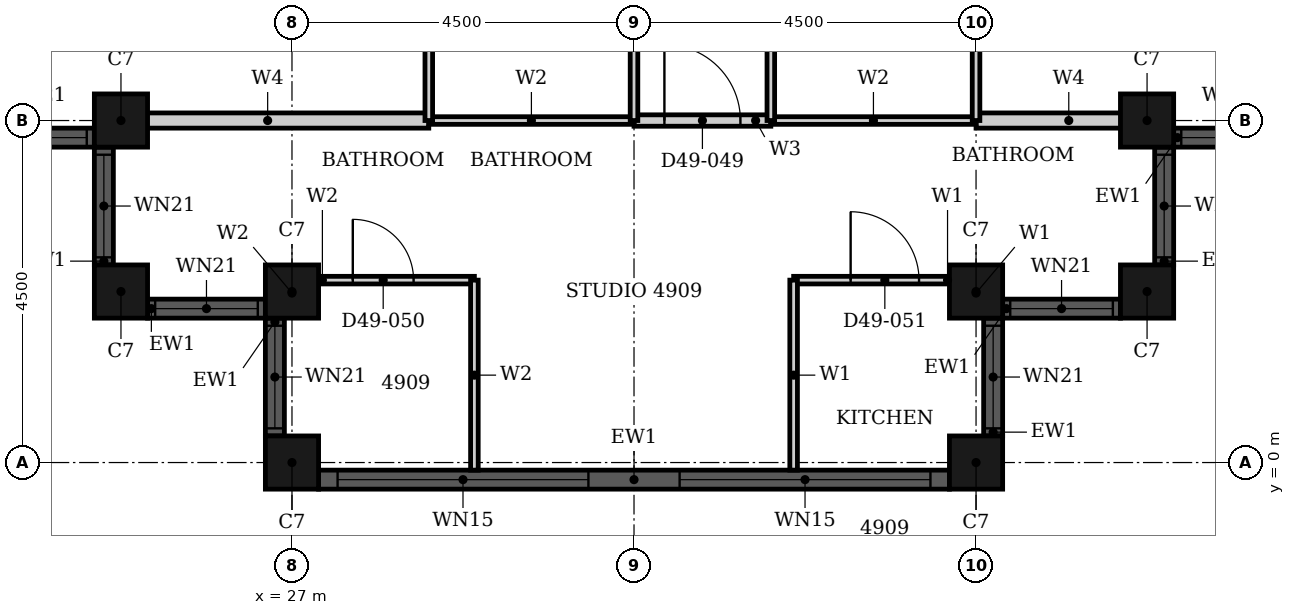
"""IFC4 building model, lengths in metres.
Left out: names, types, materials, properties, quantities, classifications, styles, units other than length and angle.
Written with IfcOpenShell. Run it as: python <this file> out.ifc"""

import sys

from ifc_helpers import new_model, si_unit, direction, frame, frame_2d, origin, origin_2d, place, context, subcontext, project, spatial, rectangle, hollow_rectangle, extrude, element, fill, save


model = new_model("IFC4")
c1 = context("Model", 3, precision=1e-05, world=origin(), true_north=direction((0.0, 1.0)))
c2 = subcontext(c1, "Body", "Model", "MODEL_VIEW")
j1 = project(units=[si_unit("LENGTHUNIT", "METRE"), si_unit("PLANEANGLEUNIT", "RADIAN")], contexts=[c1])
p1 = place(None, origin())
s1 = spatial("IfcSite", under=j1, at=p1, CompositionType="ELEMENT")
p2 = place(p1, origin())
s2 = spatial("IfcBuilding", under=s1, at=p2, CompositionType="ELEMENT")
p3 = place(p2, frame((0.0, 0.0, 196.1)))
s3 = spatial("IfcBuildingStorey", under=s2, at=p3, CompositionType="ELEMENT", Elevation=196.1)
for number, where, z_axis, x_axis in (
    (1, (24.75, 4.5, 0.0), (0.0, 0.0, 1.0), (1.0, 0.0, 0.0)),
    (2, (24.75, 2.25, 0.0), (0.0, 0.0, 1.0), (1.0, 0.0, 0.0)),
    (3, (27.0, 2.25, 0.0), (0.0, 0.0, 1.0), (1.0, 0.0, 0.0)),
    (4, (27.0, 0.0, 0.0), (0.0, 0.0, 1.0), (1.0, 0.0, 0.0)),
    (5, (36.0, 0.0, 0.0), (0.0, 0.0, 1.0), (1.0, 0.0, 0.0)),
    (6, (36.0, 2.25, 0.0), (0.0, 0.0, 1.0), (1.0, 0.0, 0.0)),
    (7, (38.25, 2.25, 0.0), (0.0, 0.0, 1.0), (1.0, 0.0, 0.0)),
    (8, (38.25, 4.5, 0.0), (0.0, 0.0, 1.0), (1.0, 0.0, 0.0)),
):
    element("IfcColumn", number, at=place(p3, frame(where, z_axis=z_axis, x_axis=x_axis)), inside=s3, PredefinedType="COLUMN", context=c2, shape_type="SweptSolid", body=[
        extrude(hollow_rectangle(XDim=0.7, YDim=0.7, WallThickness=0.022, at=origin_2d()), origin(), (0.0, 0.0, 1.0), 3.7),
    ])
p4 = place(p3, frame((22.85, 4.275, 0.0), z_axis=(0.0, 0.0, 1.0), x_axis=(1.0, 0.0, 0.0)))
e9 = element("IfcWall", 9, at=p4, inside=s3, PredefinedType="SOLIDWALL", context=c2, shape_type="SweptSolid", body=[
    extrude(rectangle(XDim=1.55, YDim=0.25, at=frame_2d((0.775, 0.0))), origin(), (0.0, 0.0, 1.0), 3.7),
])
p5 = place(p4, frame((0.1, 0.0, 0.9)))
e10 = element("IfcOpeningElement", 10, at=p5, cuts=e9, PredefinedType="OPENING", context=c2, shape_type="SweptSolid", body=[
    extrude(rectangle(XDim=1.35, YDim=1.85, at=frame_2d((0.675, 0.925))), frame((0.0, 0.135, 0.0), z_axis=(0.0, -1.0, 0.0), x_axis=(1.0, 0.0, 0.0)), (0.0, 0.0, 1.0), 0.27),
])
p6 = place(p3, frame((24.525, 4.15, 0.0), z_axis=(0.0, 0.0, 1.0), x_axis=(0.0, -1.0, 0.0)))
e11 = element("IfcWall", 11, at=p6, inside=s3, PredefinedType="SOLIDWALL", context=c2, shape_type="SweptSolid", body=[
    extrude(rectangle(XDim=1.55, YDim=0.25, at=frame_2d((0.775, 0.0))), origin(), (0.0, 0.0, 1.0), 3.7),
])
p7 = place(p6, frame((0.1, 0.0, 0.9)))
e12 = element("IfcOpeningElement", 12, at=p7, cuts=e11, PredefinedType="OPENING", context=c2, shape_type="SweptSolid", body=[
    extrude(rectangle(XDim=1.35, YDim=1.85, at=frame_2d((0.675, 0.925))), frame((0.0, 0.135, 0.0), z_axis=(0.0, -1.0, 0.0), x_axis=(1.0, 0.0, 0.0)), (0.0, 0.0, 1.0), 0.27),
])
p8 = place(p3, frame((25.1, 2.025, 0.0), z_axis=(0.0, 0.0, 1.0), x_axis=(1.0, 0.0, 0.0)))
e13 = element("IfcWall", 13, at=p8, inside=s3, PredefinedType="SOLIDWALL", context=c2, shape_type="SweptSolid", body=[
    extrude(rectangle(XDim=1.55, YDim=0.25, at=frame_2d((0.775, 0.0))), origin(), (0.0, 0.0, 1.0), 3.7),
])
p9 = place(p8, frame((0.1, 0.0, 0.9)))
e14 = element("IfcOpeningElement", 14, at=p9, cuts=e13, PredefinedType="OPENING", context=c2, shape_type="SweptSolid", body=[
    extrude(rectangle(XDim=1.35, YDim=1.85, at=frame_2d((0.675, 0.925))), frame((0.0, 0.135, 0.0), z_axis=(0.0, -1.0, 0.0), x_axis=(1.0, 0.0, 0.0)), (0.0, 0.0, 1.0), 0.27),
])
p10 = place(p3, frame((26.775, 1.9, 0.0), z_axis=(0.0, 0.0, 1.0), x_axis=(0.0, -1.0, 0.0)))
e15 = element("IfcWall", 15, at=p10, inside=s3, PredefinedType="SOLIDWALL", context=c2, shape_type="SweptSolid", body=[
    extrude(rectangle(XDim=1.55, YDim=0.25, at=frame_2d((0.775, 0.0))), origin(), (0.0, 0.0, 1.0), 3.7),
])
p11 = place(p10, frame((0.1, 0.0, 0.9)))
e16 = element("IfcOpeningElement", 16, at=p11, cuts=e15, PredefinedType="OPENING", context=c2, shape_type="SweptSolid", body=[
    extrude(rectangle(XDim=1.35, YDim=1.85, at=frame_2d((0.675, 0.925))), frame((0.0, 0.135, 0.0), z_axis=(0.0, -1.0, 0.0), x_axis=(1.0, 0.0, 0.0)), (0.0, 0.0, 1.0), 0.27),
])
p12 = place(p3, frame((27.35, -0.225, 0.0), z_axis=(0.0, 0.0, 1.0), x_axis=(1.0, 0.0, 0.0)))
e17 = element("IfcWall", 17, at=p12, inside=s3, PredefinedType="SOLIDWALL", context=c2, shape_type="SweptSolid", body=[
    extrude(rectangle(XDim=8.3, YDim=0.25, at=frame_2d((4.15, 0.0))), origin(), (0.0, 0.0, 1.0), 3.7),
])
p13 = place(p12, frame((0.25, 0.0, 0.45)))
e18 = element("IfcOpeningElement", 18, at=p13, cuts=e17, PredefinedType="OPENING", context=c2, shape_type="SweptSolid", body=[
    extrude(rectangle(XDim=3.3, YDim=2.3, at=frame_2d((1.65, 1.15))), frame((0.0, 0.135, 0.0), z_axis=(0.0, -1.0, 0.0), x_axis=(1.0, 0.0, 0.0)), (0.0, 0.0, 1.0), 0.27),
])
p14 = place(p12, frame((4.75, 0.0, 0.45)))
e19 = element("IfcOpeningElement", 19, at=p14, cuts=e17, PredefinedType="OPENING", context=c2, shape_type="SweptSolid", body=[
    extrude(rectangle(XDim=3.3, YDim=2.3, at=frame_2d((1.65, 1.15))), frame((0.0, 0.135, 0.0), z_axis=(0.0, -1.0, 0.0), x_axis=(1.0, 0.0, 0.0)), (0.0, 0.0, 1.0), 0.27),
])
p15 = place(p3, frame((36.225, 0.35, 0.0), z_axis=(0.0, 0.0, 1.0), x_axis=(0.0, 1.0, 0.0)))
e20 = element("IfcWall", 20, at=p15, inside=s3, PredefinedType="SOLIDWALL", context=c2, shape_type="SweptSolid", body=[
    extrude(rectangle(XDim=1.55, YDim=0.25, at=frame_2d((0.775, 0.0))), origin(), (0.0, 0.0, 1.0), 3.7),
])
p16 = place(p15, frame((0.1, 0.0, 0.9)))
e21 = element("IfcOpeningElement", 21, at=p16, cuts=e20, PredefinedType="OPENING", context=c2, shape_type="SweptSolid", body=[
    extrude(rectangle(XDim=1.35, YDim=1.85, at=frame_2d((0.675, 0.925))), frame((0.0, 0.135, 0.0), z_axis=(0.0, -1.0, 0.0), x_axis=(1.0, 0.0, 0.0)), (0.0, 0.0, 1.0), 0.27),
])
p17 = place(p3, frame((36.35, 2.025, 0.0), z_axis=(0.0, 0.0, 1.0), x_axis=(1.0, 0.0, 0.0)))
e22 = element("IfcWall", 22, at=p17, inside=s3, PredefinedType="SOLIDWALL", context=c2, shape_type="SweptSolid", body=[
    extrude(rectangle(XDim=1.55, YDim=0.25, at=frame_2d((0.775, 0.0))), origin(), (0.0, 0.0, 1.0), 3.7),
])
p18 = place(p17, frame((0.1, 0.0, 0.9)))
e23 = element("IfcOpeningElement", 23, at=p18, cuts=e22, PredefinedType="OPENING", context=c2, shape_type="SweptSolid", body=[
    extrude(rectangle(XDim=1.35, YDim=1.85, at=frame_2d((0.675, 0.925))), frame((0.0, 0.135, 0.0), z_axis=(0.0, -1.0, 0.0), x_axis=(1.0, 0.0, 0.0)), (0.0, 0.0, 1.0), 0.27),
])
p19 = place(p3, frame((38.475, 2.6, 0.0), z_axis=(0.0, 0.0, 1.0), x_axis=(0.0, 1.0, 0.0)))
e24 = element("IfcWall", 24, at=p19, inside=s3, PredefinedType="SOLIDWALL", context=c2, shape_type="SweptSolid", body=[
    extrude(rectangle(XDim=1.55, YDim=0.25, at=frame_2d((0.775, 0.0))), origin(), (0.0, 0.0, 1.0), 3.7),
])
p20 = place(p19, frame((0.1, 0.0, 0.9)))
e25 = element("IfcOpeningElement", 25, at=p20, cuts=e24, PredefinedType="OPENING", context=c2, shape_type="SweptSolid", body=[
    extrude(rectangle(XDim=1.35, YDim=1.85, at=frame_2d((0.675, 0.925))), frame((0.0, 0.135, 0.0), z_axis=(0.0, -1.0, 0.0), x_axis=(1.0, 0.0, 0.0)), (0.0, 0.0, 1.0), 0.27),
])
p21 = place(p3, frame((38.6, 4.275, 0.0), z_axis=(0.0, 0.0, 1.0), x_axis=(1.0, 0.0, 0.0)))
e26 = element("IfcWall", 26, at=p21, inside=s3, PredefinedType="SOLIDWALL", context=c2, shape_type="SweptSolid", body=[
    extrude(rectangle(XDim=1.55, YDim=0.25, at=frame_2d((0.775, 0.0))), origin(), (0.0, 0.0, 1.0), 3.7),
])
p22 = place(p21, frame((0.1, 0.0, 0.9)))
e27 = element("IfcOpeningElement", 27, at=p22, cuts=e26, PredefinedType="OPENING", context=c2, shape_type="SweptSolid", body=[
    extrude(rectangle(XDim=1.35, YDim=1.85, at=frame_2d((0.675, 0.925))), frame((0.0, 0.135, 0.0), z_axis=(0.0, -1.0, 0.0), x_axis=(1.0, 0.0, 0.0)), (0.0, 0.0, 1.0), 0.27),
])
p23 = place(p3, frame((31.5, 4.5, 0.0), z_axis=(0.0, 0.0, 1.0), x_axis=(1.0, 0.0, 0.0)))
e28 = element("IfcWall", 28, at=p23, inside=s3, PredefinedType="PARTITIONING", context=c2, shape_type="SweptSolid", body=[
    extrude(rectangle(XDim=1.8, YDim=0.15, at=frame_2d((0.9, 0.0))), origin(), (0.0, 0.0, 1.0), 3.4),
])
p24 = place(p23, frame((0.4, 0.0, 0.0)))
e29 = element("IfcOpeningElement", 29, at=p24, cuts=e28, PredefinedType="OPENING", context=c2, shape_type="SweptSolid", body=[
    extrude(rectangle(XDim=1.0, YDim=2.2, at=frame_2d((0.5, 1.1))), frame((0.0, 0.085, 0.0), z_axis=(0.0, -1.0, 0.0), x_axis=(1.0, 0.0, 0.0)), (0.0, 0.0, 1.0), 0.17),
])
p25 = place(p3, frame((33.6, 2.4, 0.0), z_axis=(0.0, 0.0, 1.0), x_axis=(1.0, 0.0, 0.0)))
e30 = element("IfcWall", 30, at=p25, inside=s3, PredefinedType="PARTITIONING", context=c2, shape_type="SweptSolid", body=[
    extrude(rectangle(XDim=2.4, YDim=0.1, at=frame_2d((1.2, 0.0))), origin(), (0.0, 0.0, 1.0), 3.4),
])
p26 = place(p25, frame((0.75, 0.0, 0.0)))
e31 = element("IfcOpeningElement", 31, at=p26, cuts=e30, PredefinedType="OPENING", context=c2, shape_type="SweptSolid", body=[
    extrude(rectangle(XDim=0.9, YDim=2.1, at=frame_2d((0.45, 1.05))), frame((0.0, 0.06, 0.0), z_axis=(0.0, -1.0, 0.0), x_axis=(1.0, 0.0, 0.0)), (0.0, 0.0, 1.0), 0.12),
])
p27 = place(p3, frame((33.6, -0.1, 0.0), z_axis=(0.0, 0.0, 1.0), x_axis=(0.0, 1.0, 0.0)))
e32 = element("IfcWall", 32, at=p27, inside=s3, PredefinedType="PARTITIONING", context=c2, shape_type="SweptSolid", body=[
    extrude(rectangle(XDim=2.5, YDim=0.1, at=frame_2d((1.25, 0.0))), origin(), (0.0, 0.0, 1.0), 3.4),
])
p28 = place(p3, frame((36.0, 2.06, 0.0), z_axis=(0.0, 0.0, 1.0), x_axis=(0.0, 1.0, 0.0)))
e33 = element("IfcWall", 33, at=p28, inside=s3, PredefinedType="PARTITIONING", context=c2, shape_type="SweptSolid", body=[
    extrude(rectangle(XDim=0.34, YDim=0.1, at=frame_2d((0.17, 0.0))), origin(), (0.0, 0.0, 1.0), 3.4),
])
p29 = place(p3, frame((36.0, 4.5, 0.0), z_axis=(0.0, 0.0, 1.0), x_axis=(1.0, 0.0, 0.0)))
e34 = element("IfcWall", 34, at=p29, inside=s3, PredefinedType="PARTITIONING", context=c2, shape_type="SweptSolid", body=[
    extrude(rectangle(XDim=2.44, YDim=0.2, at=frame_2d((1.22, 0.0))), origin(), (0.0, 0.0, 1.0), 3.4),
])
p30 = place(p3, frame((24.56, 4.5, 0.0), z_axis=(0.0, 0.0, 1.0), x_axis=(1.0, 0.0, 0.0)))
e35 = element("IfcWall", 35, at=p30, inside=s3, PredefinedType="PARTITIONING", context=c2, shape_type="SweptSolid", body=[
    extrude(rectangle(XDim=4.24, YDim=0.2, at=frame_2d((2.12, 0.0))), origin(), (0.0, 0.0, 1.0), 3.4),
])
p31 = place(p3, frame((27.0, 2.4, 0.0), z_axis=(0.0, 0.0, 1.0), x_axis=(1.0, 0.0, 0.0)))
e36 = element("IfcWall", 36, at=p31, inside=s3, PredefinedType="PARTITIONING", context=c2, shape_type="SweptSolid", body=[
    extrude(rectangle(XDim=2.4, YDim=0.1, at=frame_2d((1.2, 0.0))), origin(), (0.0, 0.0, 1.0), 3.4),
])
p32 = place(p31, frame((0.8, 0.0, 0.0)))
e37 = element("IfcOpeningElement", 37, at=p32, cuts=e36, PredefinedType="OPENING", context=c2, shape_type="SweptSolid", body=[
    extrude(rectangle(XDim=0.8, YDim=2.1, at=frame_2d((0.4, 1.05))), frame((0.0, 0.06, 0.0), z_axis=(0.0, -1.0, 0.0), x_axis=(1.0, 0.0, 0.0)), (0.0, 0.0, 1.0), 0.12),
])
for number, where, z_axis, x_axis in (
    (38, (33.3, 4.5, 0.0), (0.0, 0.0, 1.0), (1.0, 0.0, 0.0)),
    (39, (28.8, 4.5, 0.0), (0.0, 0.0, 1.0), (1.0, 0.0, 0.0)),
):
    element("IfcWall", number, at=place(p3, frame(where, z_axis=z_axis, x_axis=x_axis)), inside=s3, PredefinedType="PARTITIONING", context=c2, shape_type="SweptSolid", body=[
        extrude(rectangle(XDim=2.7, YDim=0.1, at=frame_2d((1.35, 0.0))), origin(), (0.0, 0.0, 1.0), 3.4),
    ])
p33 = place(p3, frame((27.0, 2.06, 0.0), z_axis=(0.0, 0.0, 1.0), x_axis=(0.0, 1.0, 0.0)))
e40 = element("IfcWall", 40, at=p33, inside=s3, PredefinedType="PARTITIONING", context=c2, shape_type="SweptSolid", body=[
    extrude(rectangle(XDim=0.34, YDim=0.1, at=frame_2d((0.17, 0.0))), origin(), (0.0, 0.0, 1.0), 3.4),
])
p34 = place(p3, frame((28.8, 4.5, 0.0), z_axis=(0.0, 0.0, 1.0), x_axis=(0.0, 1.0, 0.0)))
e41 = element("IfcWall", 41, at=p34, inside=s3, PredefinedType="PARTITIONING", context=c2, shape_type="SweptSolid", body=[
    extrude(rectangle(XDim=2.4, YDim=0.1, at=frame_2d((1.2, 0.0))), origin(), (0.0, 0.0, 1.0), 3.4),
])
p35 = place(p3, frame((29.4, -0.1, 0.0), z_axis=(0.0, 0.0, 1.0), x_axis=(0.0, 1.0, 0.0)))
e42 = element("IfcWall", 42, at=p35, inside=s3, PredefinedType="PARTITIONING", context=c2, shape_type="SweptSolid", body=[
    extrude(rectangle(XDim=2.5, YDim=0.1, at=frame_2d((1.25, 0.0))), origin(), (0.0, 0.0, 1.0), 3.4),
])
p36 = place(p3, frame((31.5, 4.5, 0.0), z_axis=(0.0, 0.0, 1.0), x_axis=(0.0, 1.0, 0.0)))
e43 = element("IfcWall", 43, at=p36, inside=s3, PredefinedType="PARTITIONING", context=c2, shape_type="SweptSolid", body=[
    extrude(rectangle(XDim=2.4, YDim=0.1, at=frame_2d((1.2, 0.0))), origin(), (0.0, 0.0, 1.0), 2.68),
])
p37 = place(p3, frame((33.3, 4.5, 0.0), z_axis=(0.0, 0.0, 1.0), x_axis=(0.0, 1.0, 0.0)))
e44 = element("IfcWall", 44, at=p37, inside=s3, PredefinedType="PARTITIONING", context=c2, shape_type="SweptSolid", body=[
    extrude(rectangle(XDim=2.4, YDim=0.1, at=frame_2d((1.2, 0.0))), origin(), (0.0, 0.0, 1.0), 3.4),
])
p38 = place(p3, frame((36.0, 4.5, 0.0), z_axis=(0.0, 0.0, 1.0), x_axis=(0.0, 1.0, 0.0)))
e45 = element("IfcWall", 45, at=p38, inside=s3, PredefinedType="PARTITIONING", context=c2, shape_type="SweptSolid", body=[
    extrude(rectangle(XDim=2.4, YDim=0.1, at=frame_2d((1.2, 0.0))), origin(), (0.0, 0.0, 1.0), 2.68),
])
p39 = place(p5, origin())
e46 = element("IfcWindow", 46, at=p39, inside=s3, PartitioningType="SINGLE_PANEL", PredefinedType="WINDOW", context=c2, shape_type="SweptSolid", body=[
    extrude(rectangle(XDim=1.35, YDim=1.85, at=frame_2d((0.675, 0.925))), frame((0.0, 0.03, 0.0), z_axis=(0.0, -1.0, 0.0), x_axis=(1.0, 0.0, 0.0)), (0.0, 0.0, 1.0), 0.06),
])
fill(e10, e46)
p40 = place(p7, origin())
e47 = element("IfcWindow", 47, at=p40, inside=s3, PartitioningType="SINGLE_PANEL", PredefinedType="WINDOW", context=c2, shape_type="SweptSolid", body=[
    extrude(rectangle(XDim=1.35, YDim=1.85, at=frame_2d((0.675, 0.925))), frame((0.0, 0.03, 0.0), z_axis=(0.0, -1.0, 0.0), x_axis=(1.0, 0.0, 0.0)), (0.0, 0.0, 1.0), 0.06),
])
fill(e12, e47)
p41 = place(p9, origin())
e48 = element("IfcWindow", 48, at=p41, inside=s3, PartitioningType="SINGLE_PANEL", PredefinedType="WINDOW", context=c2, shape_type="SweptSolid", body=[
    extrude(rectangle(XDim=1.35, YDim=1.85, at=frame_2d((0.675, 0.925))), frame((0.0, 0.03, 0.0), z_axis=(0.0, -1.0, 0.0), x_axis=(1.0, 0.0, 0.0)), (0.0, 0.0, 1.0), 0.06),
])
fill(e14, e48)
p42 = place(p11, origin())
e49 = element("IfcWindow", 49, at=p42, inside=s3, PartitioningType="SINGLE_PANEL", PredefinedType="WINDOW", context=c2, shape_type="SweptSolid", body=[
    extrude(rectangle(XDim=1.35, YDim=1.85, at=frame_2d((0.675, 0.925))), frame((0.0, 0.03, 0.0), z_axis=(0.0, -1.0, 0.0), x_axis=(1.0, 0.0, 0.0)), (0.0, 0.0, 1.0), 0.06),
])
fill(e16, e49)
p43 = place(p13, origin())
e50 = element("IfcWindow", 50, at=p43, inside=s3, PartitioningType="SINGLE_PANEL", PredefinedType="WINDOW", context=c2, shape_type="SweptSolid", body=[
    extrude(rectangle(XDim=3.3, YDim=2.3, at=frame_2d((1.65, 1.15))), frame((0.0, 0.03, 0.0), z_axis=(0.0, -1.0, 0.0), x_axis=(1.0, 0.0, 0.0)), (0.0, 0.0, 1.0), 0.06),
])
fill(e18, e50)
p44 = place(p14, origin())
e51 = element("IfcWindow", 51, at=p44, inside=s3, PartitioningType="SINGLE_PANEL", PredefinedType="WINDOW", context=c2, shape_type="SweptSolid", body=[
    extrude(rectangle(XDim=3.3, YDim=2.3, at=frame_2d((1.65, 1.15))), frame((0.0, 0.03, 0.0), z_axis=(0.0, -1.0, 0.0), x_axis=(1.0, 0.0, 0.0)), (0.0, 0.0, 1.0), 0.06),
])
fill(e19, e51)
p45 = place(p16, origin())
e52 = element("IfcWindow", 52, at=p45, inside=s3, PartitioningType="SINGLE_PANEL", PredefinedType="WINDOW", context=c2, shape_type="SweptSolid", body=[
    extrude(rectangle(XDim=1.35, YDim=1.85, at=frame_2d((0.675, 0.925))), frame((0.0, 0.03, 0.0), z_axis=(0.0, -1.0, 0.0), x_axis=(1.0, 0.0, 0.0)), (0.0, 0.0, 1.0), 0.06),
])
fill(e21, e52)
p46 = place(p18, origin())
e53 = element("IfcWindow", 53, at=p46, inside=s3, PartitioningType="SINGLE_PANEL", PredefinedType="WINDOW", context=c2, shape_type="SweptSolid", body=[
    extrude(rectangle(XDim=1.35, YDim=1.85, at=frame_2d((0.675, 0.925))), frame((0.0, 0.03, 0.0), z_axis=(0.0, -1.0, 0.0), x_axis=(1.0, 0.0, 0.0)), (0.0, 0.0, 1.0), 0.06),
])
fill(e23, e53)
p47 = place(p20, origin())
e54 = element("IfcWindow", 54, at=p47, inside=s3, PartitioningType="SINGLE_PANEL", PredefinedType="WINDOW", context=c2, shape_type="SweptSolid", body=[
    extrude(rectangle(XDim=1.35, YDim=1.85, at=frame_2d((0.675, 0.925))), frame((0.0, 0.03, 0.0), z_axis=(0.0, -1.0, 0.0), x_axis=(1.0, 0.0, 0.0)), (0.0, 0.0, 1.0), 0.06),
])
fill(e25, e54)
p48 = place(p22, origin())
e55 = element("IfcWindow", 55, at=p48, inside=s3, PartitioningType="SINGLE_PANEL", PredefinedType="WINDOW", context=c2, shape_type="SweptSolid", body=[
    extrude(rectangle(XDim=1.35, YDim=1.85, at=frame_2d((0.675, 0.925))), frame((0.0, 0.03, 0.0), z_axis=(0.0, -1.0, 0.0), x_axis=(1.0, 0.0, 0.0)), (0.0, 0.0, 1.0), 0.06),
])
fill(e27, e55)
p49 = place(p24, origin())
e56 = element("IfcDoor", 56, at=p49, inside=s3, OperationType="SINGLE_SWING_LEFT", PredefinedType="DOOR", context=c2, shape_type="SweptSolid", body=[
    extrude(rectangle(XDim=1.0, YDim=2.2, at=frame_2d((0.5, 1.1))), frame((0.0, 0.025, 0.0), z_axis=(0.0, -1.0, 0.0), x_axis=(1.0, 0.0, 0.0)), (0.0, 0.0, 1.0), 0.05),
])
fill(e29, e56)
p50 = place(p32, origin())
e57 = element("IfcDoor", 57, at=p50, inside=s3, OperationType="SINGLE_SWING_LEFT", PredefinedType="DOOR", context=c2, shape_type="SweptSolid", body=[
    extrude(rectangle(XDim=0.8, YDim=2.1, at=frame_2d((0.4, 1.05))), frame((0.0, 0.025, 0.0), z_axis=(0.0, -1.0, 0.0), x_axis=(1.0, 0.0, 0.0)), (0.0, 0.0, 1.0), 0.05),
])
fill(e37, e57)
p51 = place(p26, origin())
e58 = element("IfcDoor", 58, at=p51, inside=s3, OperationType="SINGLE_SWING_LEFT", PredefinedType="DOOR", context=c2, shape_type="SweptSolid", body=[
    extrude(rectangle(XDim=0.9, YDim=2.1, at=frame_2d((0.45, 1.05))), frame((0.0, 0.025, 0.0), z_axis=(0.0, -1.0, 0.0), x_axis=(1.0, 0.0, 0.0)), (0.0, 0.0, 1.0), 0.05),
])
fill(e31, e58)
save(model, sys.argv[1])
